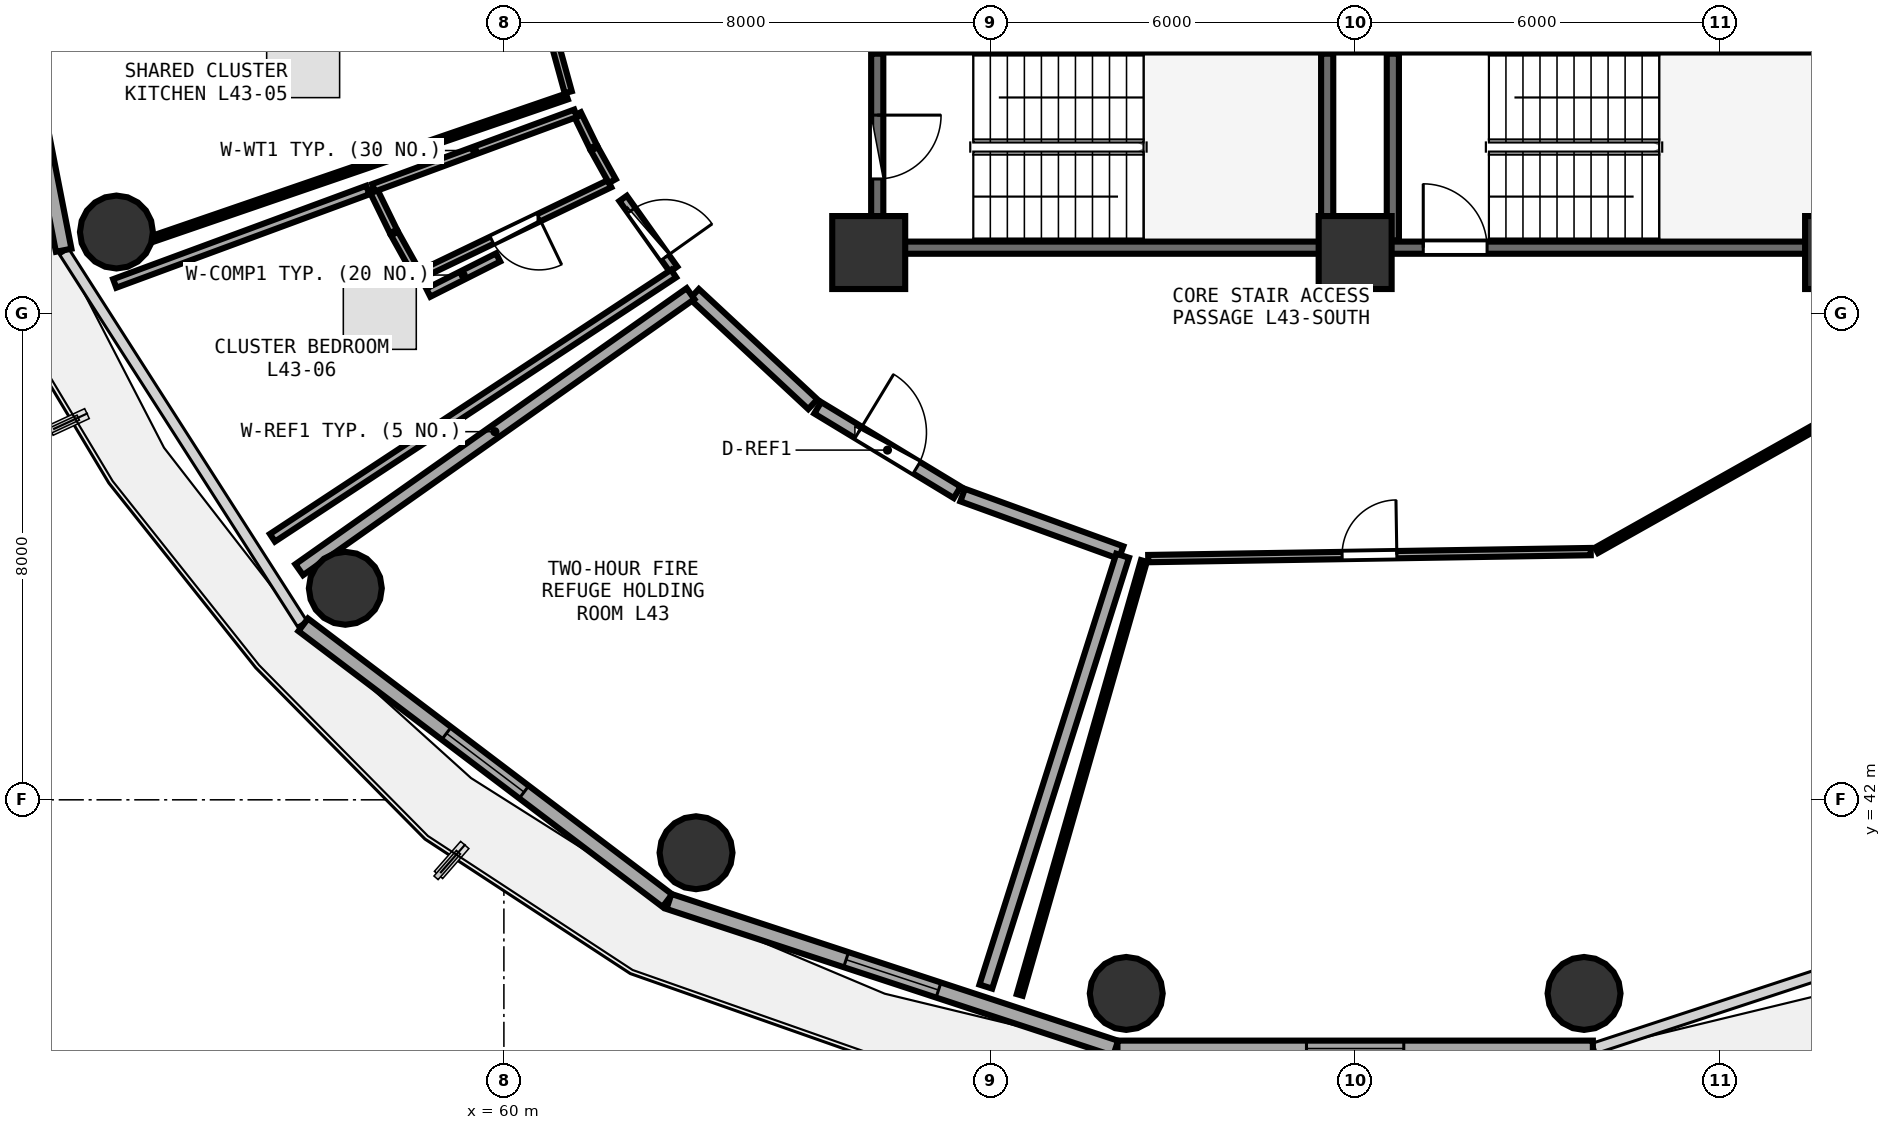
"""IFC4 building model, lengths in metres.
Left out: names, types, materials, properties, quantities, classifications, styles, units other than length and angle.
Written with IfcOpenShell. Run it as: python <this file> out.ifc"""

import sys

from ifc_helpers import new_model, si_unit, direction, frame, frame_2d, origin, origin_2d, place, context, subcontext, project, spatial, rectangle, circle, extrude, element, fill, save


model = new_model("IFC4")
c1 = context("Model", 3, precision=1e-05, world=origin(), true_north=direction((0.0, 1.0)))
c2 = subcontext(c1, "Body", "Model", "MODEL_VIEW")
j1 = project(units=[si_unit("LENGTHUNIT", "METRE"), si_unit("PLANEANGLEUNIT", "RADIAN")], contexts=[c1])
p1 = place(None, origin())
s1 = spatial("IfcSite", under=j1, at=p1, CompositionType="ELEMENT")
p2 = place(p1, origin())
s2 = spatial("IfcBuilding", under=s1, at=p2, CompositionType="ELEMENT")
p3 = place(p2, frame((0.0, 0.0, 169.35)))
s3 = spatial("IfcBuildingStorey", under=s2, at=p3, CompositionType="ELEMENT", Elevation=169.35)
for number, where, z_axis, x_axis in (
    (1, (66.0, 51.0, 0.0), (0.0, 0.0, 1.0), (1.0, 0.0, 0.0)),
    (2, (74.0, 51.0, 0.0), (0.0, 0.0, 1.0), (1.0, 0.0, 0.0)),
    (3, (82.0, 51.0, 0.0), (0.0, 0.0, 1.0), (1.0, 0.0, 0.0)),
):
    element("IfcColumn", number, at=place(p3, frame(where, z_axis=z_axis, x_axis=x_axis)), inside=s3, PredefinedType="PILASTER", context=c2, shape_type="SweptSolid", body=[
        extrude(rectangle(XDim=1.2, YDim=1.2, at=origin_2d()), origin(), (0.0, 0.0, 1.0), 3.75),
    ])
for number, where, z_axis, x_axis in (
    (4, (53.627, 51.337, 0.0), (0.0, 0.0, 1.0), (1.0, 0.0, 0.0)),
    (5, (57.392, 45.479, 0.0), (0.0, 0.0, 1.0), (1.0, 0.0, 0.0)),
    (6, (63.16, 41.13, 0.0), (0.0, 0.0, 1.0), (1.0, 0.0, 0.0)),
    (7, (70.235, 38.816, 0.0), (0.0, 0.0, 1.0), (1.0, 0.0, 0.0)),
    (8, (77.765, 38.816, 0.0), (0.0, 0.0, 1.0), (1.0, 0.0, 0.0)),
):
    element("IfcColumn", number, at=place(p3, frame(where, z_axis=z_axis, x_axis=x_axis)), inside=s3, PredefinedType="COLUMN", context=c2, shape_type="SweptSolid", body=[
        extrude(circle(Radius=0.6, at=origin_2d()), origin(), (0.0, 0.0, 1.0), 3.75),
    ])
p4 = place(p3, frame((51.403, 57.985, 0.0), z_axis=(0.0, 0.0, 1.0), x_axis=(0.191716984769, -0.981450252306, 0.0)))
e9 = element("IfcWall", 9, at=p4, inside=s3, PredefinedType="SOLIDWALL", context=c2, shape_type="SweptSolid", body=[
    extrude(rectangle(XDim=7.079, YDim=0.26, at=frame_2d((3.54, 0.0))), origin(), (0.0, 0.0, 1.0), 3.475),
])
p5 = place(p4, frame((2.74, 0.0, 0.85)))
e10 = element("IfcOpeningElement", 10, at=p5, cuts=e9, PredefinedType="OPENING", context=c2, shape_type="SweptSolid", body=[
    extrude(rectangle(XDim=1.6, YDim=1.45, at=frame_2d((0.8, 0.725))), frame((0.0, 0.14, 0.0), z_axis=(0.0, -1.0, 0.0), x_axis=(1.0, 0.0, 0.0)), (0.0, 0.0, 1.0), 0.28),
])
p6 = place(p3, frame((56.699, 44.878, 0.0), z_axis=(0.0, 0.0, 1.0), x_axis=(0.797163719609, -0.603763202042, 0.0)))
e11 = element("IfcWall", 11, at=p6, inside=s3, PredefinedType="SOLIDWALL", context=c2, shape_type="SweptSolid", body=[
    extrude(rectangle(XDim=7.512, YDim=0.26, at=frame_2d((3.756, 0.0))), origin(), (0.0, 0.0, 1.0), 3.475),
])
p7 = place(p6, frame((2.956, 0.0, 0.85)))
e12 = element("IfcOpeningElement", 12, at=p7, cuts=e11, PredefinedType="OPENING", context=c2, shape_type="SweptSolid", body=[
    extrude(rectangle(XDim=1.6, YDim=1.45, at=frame_2d((0.8, 0.725))), frame((0.0, 0.14, 0.0), z_axis=(0.0, -1.0, 0.0), x_axis=(1.0, 0.0, 0.0)), (0.0, 0.0, 1.0), 0.28),
])
p8 = place(p3, frame((62.714, 40.328, 0.0), z_axis=(0.0, 0.0, 1.0), x_axis=(0.950038302428, -0.312133343173, 0.0)))
e13 = element("IfcWall", 13, at=p8, inside=s3, PredefinedType="SOLIDWALL", context=c2, shape_type="SweptSolid", body=[
    extrude(rectangle(XDim=7.733, YDim=0.26, at=frame_2d((3.867, 0.0))), origin(), (0.0, 0.0, 1.0), 3.475),
])
p9 = place(p8, frame((3.067, 0.0, 0.85)))
e14 = element("IfcOpeningElement", 14, at=p9, cuts=e13, PredefinedType="OPENING", context=c2, shape_type="SweptSolid", body=[
    extrude(rectangle(XDim=1.6, YDim=1.45, at=frame_2d((0.8, 0.725))), frame((0.0, 0.14, 0.0), z_axis=(0.0, -1.0, 0.0), x_axis=(1.0, 0.0, 0.0)), (0.0, 0.0, 1.0), 0.28),
])
p10 = place(p3, frame((70.091, 37.91, 0.0), z_axis=(0.0, 0.0, 1.0), x_axis=(1.0, 0.0, 0.0)))
e15 = element("IfcWall", 15, at=p10, inside=s3, PredefinedType="SOLIDWALL", context=c2, shape_type="SweptSolid", body=[
    extrude(rectangle(XDim=7.819, YDim=0.26, at=frame_2d((3.909, 0.0))), origin(), (0.0, 0.0, 1.0), 3.475),
])
p11 = place(p10, frame((3.109, 0.0, 0.85)))
e16 = element("IfcOpeningElement", 16, at=p11, cuts=e15, PredefinedType="OPENING", context=c2, shape_type="SweptSolid", body=[
    extrude(rectangle(XDim=1.6, YDim=1.45, at=frame_2d((0.8, 0.725))), frame((0.0, 0.14, 0.0), z_axis=(0.0, -1.0, 0.0), x_axis=(1.0, 0.0, 0.0)), (0.0, 0.0, 1.0), 0.28),
])
p12 = place(p3, frame((74.0, 51.08, 0.0), z_axis=(0.0, 0.0, 1.0), x_axis=(1.0, 0.0, 0.0)))
e17 = element("IfcWall", 17, at=p12, inside=s3, PredefinedType="SHEAR", context=c2, shape_type="SweptSolid", body=[
    extrude(rectangle(XDim=7.9, YDim=0.2, at=frame_2d((3.95, 0.0))), origin(), (0.0, 0.0, 1.0), 3.49),
])
p13 = place(p12, frame((1.12, 0.0, 0.0)))
e18 = element("IfcOpeningElement", 18, at=p13, cuts=e17, PredefinedType="OPENING", context=c2, shape_type="SweptSolid", body=[
    extrude(rectangle(XDim=1.05, YDim=2.1, at=frame_2d((0.525, 1.05))), frame((0.0, 0.11, 0.0), z_axis=(0.0, -1.0, 0.0), x_axis=(1.0, 0.0, 0.0)), (0.0, 0.0, 1.0), 0.22),
])
p14 = place(p3, frame((81.9, 54.39, 0.0), z_axis=(0.0, 0.0, 1.0), x_axis=(-1.0, 0.0, 0.0)))
e19 = element("IfcWall", 19, at=p14, inside=s3, PredefinedType="SHEAR", context=c2, shape_type="SweptSolid", body=[
    extrude(rectangle(XDim=8.46, YDim=0.2, at=frame_2d((4.23, 0.0))), origin(), (0.0, 0.0, 1.0), 3.49),
])
p15 = place(p3, frame((74.62, 54.27, 0.0), z_axis=(0.0, 0.0, 1.0), x_axis=(0.0, -1.0, 0.0)))
e20 = element("IfcWall", 20, at=p15, inside=s3, PredefinedType="SHEAR", context=c2, shape_type="SweptSolid", body=[
    extrude(rectangle(XDim=3.07, YDim=0.2, at=frame_2d((1.535, 0.0))), origin(), (0.0, 0.0, 1.0), 3.49),
])
p16 = place(p3, frame((66.26, 51.08, 0.0), z_axis=(0.0, 0.0, 1.0), x_axis=(1.0, 0.0, 0.0)))
e21 = element("IfcWall", 21, at=p16, inside=s3, PredefinedType="SHEAR", context=c2, shape_type="SweptSolid", body=[
    extrude(rectangle(XDim=7.16, YDim=0.2, at=frame_2d((3.58, 0.0))), origin(), (0.0, 0.0, 1.0), 3.49),
])
p17 = place(p3, frame((73.54, 51.2, 0.0), z_axis=(0.0, 0.0, 1.0), x_axis=(0.0, 1.0, 0.0)))
e22 = element("IfcWall", 22, at=p17, inside=s3, PredefinedType="SHEAR", context=c2, shape_type="SweptSolid", body=[
    extrude(rectangle(XDim=3.07, YDim=0.2, at=frame_2d((1.535, 0.0))), origin(), (0.0, 0.0, 1.0), 3.49),
])
p18 = place(p3, frame((73.42, 54.39, 0.0), z_axis=(0.0, 0.0, 1.0), x_axis=(-1.0, 0.0, 0.0)))
e23 = element("IfcWall", 23, at=p18, inside=s3, PredefinedType="SHEAR", context=c2, shape_type="SweptSolid", body=[
    extrude(rectangle(XDim=7.16, YDim=0.2, at=frame_2d((3.58, 0.0))), origin(), (0.0, 0.0, 1.0), 3.49),
])
p19 = place(p3, frame((66.14, 54.27, 0.0), z_axis=(0.0, 0.0, 1.0), x_axis=(0.0, -1.0, 0.0)))
e24 = element("IfcWall", 24, at=p19, inside=s3, PredefinedType="SHEAR", context=c2, shape_type="SweptSolid", body=[
    extrude(rectangle(XDim=3.07, YDim=0.2, at=frame_2d((1.535, 0.0))), origin(), (0.0, 0.0, 1.0), 3.49),
])
p20 = place(p19, frame((1.01, 0.0, 0.0)))
e25 = element("IfcOpeningElement", 25, at=p20, cuts=e24, PredefinedType="OPENING", context=c2, shape_type="SweptSolid", body=[
    extrude(rectangle(XDim=1.05, YDim=2.1, at=frame_2d((0.525, 1.05))), frame((0.0, 0.11, 0.0), z_axis=(0.0, -1.0, 0.0), x_axis=(1.0, 0.0, 0.0)), (0.0, 0.0, 1.0), 0.22),
])
p21 = place(p3, frame((65.161, 48.447, 0.0), z_axis=(0.0, 0.0, 1.0), x_axis=(0.855147717505, -0.518384395257, 0.0)))
e26 = element("IfcWall", 26, at=p21, inside=s3, PredefinedType="SOLIDWALL", context=c2, shape_type="SweptSolid", body=[
    extrude(rectangle(XDim=2.683, YDim=0.22, at=frame_2d((1.342, 0.0))), origin(), (0.0, 0.0, 1.0), 2.975),
])
p22 = place(p21, frame((0.782, 0.0, 0.0)))
e27 = element("IfcOpeningElement", 27, at=p22, cuts=e26, PredefinedType="OPENING", context=c2, shape_type="SweptSolid", body=[
    extrude(rectangle(XDim=1.12, YDim=2.1, at=frame_2d((0.56, 1.05))), frame((0.0, 0.12, 0.0), z_axis=(0.0, -1.0, 0.0), x_axis=(1.0, 0.0, 0.0)), (0.0, 0.0, 1.0), 0.24),
])
p23 = place(p3, frame((70.597, 45.967, 0.0), z_axis=(0.0, 0.0, 1.0), x_axis=(0.999874646692, 0.0158332215, 0.0)))
e28 = element("IfcWall", 28, at=p23, inside=s3, PredefinedType="PARTITIONING", context=c2, shape_type="SweptSolid", body=[
    extrude(rectangle(XDim=7.278, YDim=0.12, at=frame_2d((3.639, 0.0))), origin(), (0.0, 0.0, 1.0), 2.975),
])
p24 = place(p23, frame((3.189, 0.0, 0.0)))
e29 = element("IfcOpeningElement", 29, at=p24, cuts=e28, PredefinedType="OPENING", context=c2, shape_type="SweptSolid", body=[
    extrude(rectangle(XDim=0.9, YDim=2.08, at=frame_2d((0.45, 1.04))), frame((0.0, 0.07, 0.0), z_axis=(0.0, -1.0, 0.0), x_axis=(1.0, 0.0, 0.0)), (0.0, 0.0, 1.0), 0.14),
])
p25 = place(p3, frame((60.288, 56.434, 0.0), z_axis=(0.0, 0.0, 1.0), x_axis=(0.265473290907, -0.964118214647, 0.0)))
e30 = element("IfcWall", 30, at=p25, inside=s3, PredefinedType="PARTITIONING", context=c2, shape_type="SweptSolid", body=[
    extrude(rectangle(XDim=2.901, YDim=0.12, at=frame_2d((1.451, 0.0))), origin(), (0.0, 0.0, 1.0), 3.235),
])
p26 = place(p25, frame((1.001, 0.0, 0.0)))
e31 = element("IfcOpeningElement", 31, at=p26, cuts=e30, PredefinedType="OPENING", context=c2, shape_type="SweptSolid", body=[
    extrude(rectangle(XDim=0.9, YDim=2.08, at=frame_2d((0.45, 1.04))), frame((0.0, 0.07, 0.0), z_axis=(0.0, -1.0, 0.0), x_axis=(1.0, 0.0, 0.0)), (0.0, 0.0, 1.0), 0.14),
])
p27 = place(p3, frame((61.739, 52.132, 0.0), z_axis=(0.0, 0.0, 1.0), x_axis=(-0.901462056275, -0.432858130451, 0.0)))
e32 = element("IfcWall", 32, at=p27, inside=s3, PredefinedType="PLUMBINGWALL", context=c2, shape_type="SweptSolid", body=[
    extrude(rectangle(XDim=3.436, YDim=0.13, at=frame_2d((1.718, 0.0))), origin(), (0.0, 0.0, 1.0), 2.975),
])
p28 = place(p27, frame((1.288, 0.0, 0.0)))
e33 = element("IfcOpeningElement", 33, at=p28, cuts=e32, PredefinedType="OPENING", context=c2, shape_type="SweptSolid", body=[
    extrude(rectangle(XDim=0.86, YDim=2.05, at=frame_2d((0.43, 1.025))), frame((0.0, 0.075, 0.0), z_axis=(0.0, -1.0, 0.0), x_axis=(1.0, 0.0, 0.0)), (0.0, 0.0, 1.0), 0.15),
])
p29 = place(p3, frame((61.961, 51.89, 0.0), z_axis=(0.0, 0.0, 1.0), x_axis=(0.579962011666, -0.814643520213, 0.0)))
e34 = element("IfcWall", 34, at=p29, inside=s3, PredefinedType="PARTITIONING", context=c2, shape_type="SweptSolid", body=[
    extrude(rectangle(XDim=1.43, YDim=0.15, at=frame_2d((0.715, 0.0))), origin(), (0.0, 0.0, 1.0), 2.975),
])
p30 = place(p29, frame((0.24, 0.0, 0.0)))
e35 = element("IfcOpeningElement", 35, at=p30, cuts=e34, PredefinedType="OPENING", context=c2, shape_type="SweptSolid", body=[
    extrude(rectangle(XDim=0.95, YDim=2.08, at=frame_2d((0.475, 1.04))), frame((0.0, 0.085, 0.0), z_axis=(0.0, -1.0, 0.0), x_axis=(1.0, 0.0, 0.0)), (0.0, 0.0, 1.0), 0.17),
])
p31 = place(p3, frame((63.131, 50.32, 0.0), z_axis=(0.0, 0.0, 1.0), x_axis=(0.73204531194, -0.681255944023, 0.0)))
e36 = element("IfcWall", 36, at=p31, inside=s3, PredefinedType="SOLIDWALL", context=c2, shape_type="SweptSolid", body=[
    extrude(rectangle(XDim=2.663, YDim=0.22, at=frame_2d((1.332, 0.0))), origin(), (0.0, 0.0, 1.0), 2.975),
])
p32 = place(p3, frame((67.545, 47.011, 0.0), z_axis=(0.0, 0.0, 1.0), x_axis=(0.939993834649, -0.341191428411, 0.0)))
e37 = element("IfcWall", 37, at=p32, inside=s3, PredefinedType="SOLIDWALL", context=c2, shape_type="SweptSolid", body=[
    extrude(rectangle(XDim=2.772, YDim=0.22, at=frame_2d((1.386, 0.0))), origin(), (0.0, 0.0, 1.0), 3.235),
])
p33 = place(p3, frame((70.176, 46.014, 0.0), z_axis=(0.0, 0.0, 1.0), x_axis=(-0.302609911635, -0.95311449542, 0.0)))
e38 = element("IfcWall", 38, at=p33, inside=s3, PredefinedType="SOLIDWALL", context=c2, shape_type="SweptSolid", body=[
    extrude(rectangle(XDim=7.435, YDim=0.22, at=frame_2d((3.717, 0.0))), origin(), (0.0, 0.0, 1.0), 3.025),
])
p34 = place(p3, frame((56.634, 45.784, 0.0), z_axis=(0.0, 0.0, 1.0), x_axis=(0.817143941798, 0.576433672145, 0.0)))
e39 = element("IfcWall", 39, at=p34, inside=s3, PredefinedType="SOLIDWALL", context=c2, shape_type="SweptSolid", body=[
    extrude(rectangle(XDim=7.876, YDim=0.22, at=frame_2d((3.938, 0.0))), origin(), (0.0, 0.0, 1.0), 3.025),
])
p35 = place(p3, frame((77.969, 46.103, 0.0), z_axis=(0.0, 0.0, 1.0), x_axis=(0.871597530344, 0.490222138523, 0.0)))
e40 = element("IfcWall", 40, at=p35, inside=s3, PredefinedType="PARTITIONING", context=c2, shape_type="SweptSolid", body=[
    extrude(rectangle(XDim=7.115, YDim=0.1, at=frame_2d((3.557, 0.0))), origin(), (0.0, 0.0, 1.0), 2.975),
])
p36 = place(p3, frame((68.483, 38.792, 0.0), z_axis=(0.0, 0.0, 1.0), x_axis=(0.275233695356, 0.961377352001, 0.0)))
e41 = element("IfcWall", 41, at=p36, inside=s3, PredefinedType="PARTITIONING", context=c2, shape_type="SweptSolid", body=[
    extrude(rectangle(XDim=7.423, YDim=0.1, at=frame_2d((3.711, 0.0))), origin(), (0.0, 0.0, 1.0), 3.025),
])
p37 = place(p3, frame((61.036, 53.566, 0.0), z_axis=(0.0, 0.0, 1.0), x_axis=(-0.945736878945, -0.324933463656, 0.0)))
e42 = element("IfcWall", 42, at=p37, inside=s3, PredefinedType="PARTITIONING", context=c2, shape_type="SweptSolid", body=[
    extrude(rectangle(XDim=7.182, YDim=0.1, at=frame_2d((3.591, 0.0))), origin(), (0.0, 0.0, 1.0), 2.975),
])
p38 = place(p3, frame((61.207, 53.279, 0.0), z_axis=(0.0, 0.0, 1.0), x_axis=(0.438415626727, -0.898772350621, 0.0)))
e43 = element("IfcWall", 43, at=p38, inside=s3, PredefinedType="PLUMBINGWALL", context=c2, shape_type="SweptSolid", body=[
    extrude(rectangle(XDim=0.601, YDim=0.13, at=frame_2d((0.3, 0.0))), origin(), (0.0, 0.0, 1.0), 3.235),
])
p39 = place(p3, frame((61.489, 52.704, 0.0), z_axis=(0.0, 0.0, 1.0), x_axis=(0.486979465227, -0.873413418976, 0.0)))
e44 = element("IfcWall", 44, at=p39, inside=s3, PredefinedType="PLUMBINGWALL", context=c2, shape_type="SweptSolid", body=[
    extrude(rectangle(XDim=0.604, YDim=0.13, at=frame_2d((0.302, 0.0))), origin(), (0.0, 0.0, 1.0), 3.48),
])
p40 = place(p3, frame((58.578, 50.636, 0.0), z_axis=(0.0, 0.0, 1.0), x_axis=(-0.486767500689, 0.873531567989, 0.0)))
e45 = element("IfcWall", 45, at=p40, inside=s3, PredefinedType="PLUMBINGWALL", context=c2, shape_type="SweptSolid", body=[
    extrude(rectangle(XDim=0.774, YDim=0.13, at=frame_2d((0.387, 0.0))), origin(), (0.0, 0.0, 1.0), 2.975),
])
p41 = place(p3, frame((58.183, 51.348, 0.0), z_axis=(0.0, 0.0, 1.0), x_axis=(-0.438186235671, 0.898884209934, 0.0)))
e46 = element("IfcWall", 46, at=p41, inside=s3, PredefinedType="PLUMBINGWALL", context=c2, shape_type="SweptSolid", body=[
    extrude(rectangle(XDim=0.77, YDim=0.13, at=frame_2d((0.385, 0.0))), origin(), (0.0, 0.0, 1.0), 2.975),
])
p42 = place(p3, frame((57.856, 52.065, 0.0), z_axis=(0.0, 0.0, 1.0), x_axis=(0.938283087043, 0.345868253198, 0.0)))
e47 = element("IfcWall", 47, at=p42, inside=s3, PredefinedType="PLUMBINGWALL", context=c2, shape_type="SweptSolid", body=[
    extrude(rectangle(XDim=3.542, YDim=0.13, at=frame_2d((1.771, 0.0))), origin(), (0.0, 0.0, 1.0), 3.175),
])
p43 = place(p3, frame((62.792, 50.654, 0.0), z_axis=(0.0, 0.0, 1.0), x_axis=(-0.83517952007, -0.549977426133, 0.0)))
e48 = element("IfcWall", 48, at=p43, inside=s3, PredefinedType="PARTITIONING", context=c2, shape_type="SweptSolid", body=[
    extrude(rectangle(XDim=7.9, YDim=0.15, at=frame_2d((3.95, 0.0))), origin(), (0.0, 0.0, 1.0), 3.025),
])
p44 = place(p3, frame((53.6, 50.492, 0.0), z_axis=(0.0, 0.0, 1.0), x_axis=(0.938127824556, 0.346289163554, 0.0)))
e49 = element("IfcWall", 49, at=p44, inside=s3, PredefinedType="PARTITIONING", context=c2, shape_type="SweptSolid", body=[
    extrude(rectangle(XDim=4.438, YDim=0.15, at=frame_2d((2.219, 0.0))), origin(), (0.0, 0.0, 1.0), 2.975),
])
p45 = place(p3, frame((58.757, 50.34, 0.0), z_axis=(0.0, 0.0, 1.0), x_axis=(0.89282717288, 0.450399422033, 0.0)))
e50 = element("IfcWall", 50, at=p45, inside=s3, PredefinedType="PARTITIONING", context=c2, shape_type="SweptSolid", body=[
    extrude(rectangle(XDim=1.286, YDim=0.15, at=frame_2d((0.643, 0.0))), origin(), (0.0, 0.0, 1.0), 3.175),
])
p46 = place(p7, origin())
e51 = element("IfcWindow", 51, at=p46, inside=s3, PartitioningType="SINGLE_PANEL", PredefinedType="WINDOW", context=c2, shape_type="SweptSolid", body=[
    extrude(rectangle(XDim=1.6, YDim=1.45, at=frame_2d((0.8, 0.725))), frame((0.0, 0.03, 0.0), z_axis=(0.0, -1.0, 0.0), x_axis=(1.0, 0.0, 0.0)), (0.0, 0.0, 1.0), 0.06),
])
fill(e12, e51)
p47 = place(p9, origin())
e52 = element("IfcWindow", 52, at=p47, inside=s3, PartitioningType="SINGLE_PANEL", PredefinedType="WINDOW", context=c2, shape_type="SweptSolid", body=[
    extrude(rectangle(XDim=1.6, YDim=1.45, at=frame_2d((0.8, 0.725))), frame((0.0, 0.03, 0.0), z_axis=(0.0, -1.0, 0.0), x_axis=(1.0, 0.0, 0.0)), (0.0, 0.0, 1.0), 0.06),
])
fill(e14, e52)
p48 = place(p11, origin())
e53 = element("IfcWindow", 53, at=p48, inside=s3, PartitioningType="SINGLE_PANEL", PredefinedType="WINDOW", context=c2, shape_type="SweptSolid", body=[
    extrude(rectangle(XDim=1.6, YDim=1.45, at=frame_2d((0.8, 0.725))), frame((0.0, 0.03, 0.0), z_axis=(0.0, -1.0, 0.0), x_axis=(1.0, 0.0, 0.0)), (0.0, 0.0, 1.0), 0.06),
])
fill(e16, e53)
p49 = place(p13, origin())
e54 = element("IfcDoor", 54, at=p49, inside=s3, OperationType="SINGLE_SWING_LEFT", PredefinedType="DOOR", context=c2, shape_type="SweptSolid", body=[
    extrude(rectangle(XDim=1.05, YDim=2.1, at=frame_2d((0.525, 1.05))), frame((0.0, 0.025, 0.0), z_axis=(0.0, -1.0, 0.0), x_axis=(1.0, 0.0, 0.0)), (0.0, 0.0, 1.0), 0.05),
])
fill(e18, e54)
p50 = place(p20, origin())
e55 = element("IfcDoor", 55, at=p50, inside=s3, OperationType="SINGLE_SWING_LEFT", PredefinedType="DOOR", context=c2, shape_type="SweptSolid", body=[
    extrude(rectangle(XDim=1.05, YDim=2.1, at=frame_2d((0.525, 1.05))), frame((0.0, 0.025, 0.0), z_axis=(0.0, -1.0, 0.0), x_axis=(1.0, 0.0, 0.0)), (0.0, 0.0, 1.0), 0.05),
])
fill(e25, e55)
p51 = place(p22, origin())
e56 = element("IfcDoor", 56, at=p51, inside=s3, OperationType="SINGLE_SWING_LEFT", PredefinedType="DOOR", context=c2, shape_type="SweptSolid", body=[
    extrude(rectangle(XDim=1.12, YDim=2.1, at=frame_2d((0.56, 1.05))), frame((0.0, 0.025, 0.0), z_axis=(0.0, -1.0, 0.0), x_axis=(1.0, 0.0, 0.0)), (0.0, 0.0, 1.0), 0.05),
])
fill(e27, e56)
p52 = place(p24, origin())
e57 = element("IfcDoor", 57, at=p52, inside=s3, OperationType="SINGLE_SWING_RIGHT", PredefinedType="DOOR", context=c2, shape_type="SweptSolid", body=[
    extrude(rectangle(XDim=0.9, YDim=2.08, at=frame_2d((0.45, 1.04))), frame((0.0, 0.025, 0.0), z_axis=(0.0, -1.0, 0.0), x_axis=(1.0, 0.0, 0.0)), (0.0, 0.0, 1.0), 0.05),
])
fill(e29, e57)
p53 = place(p28, origin())
e58 = element("IfcDoor", 58, at=p53, inside=s3, OperationType="SINGLE_SWING_LEFT", PredefinedType="DOOR", context=c2, shape_type="SweptSolid", body=[
    extrude(rectangle(XDim=0.86, YDim=2.05, at=frame_2d((0.43, 1.025))), frame((0.0, 0.025, 0.0), z_axis=(0.0, -1.0, 0.0), x_axis=(1.0, 0.0, 0.0)), (0.0, 0.0, 1.0), 0.05),
])
fill(e33, e58)
p54 = place(p30, origin())
e59 = element("IfcDoor", 59, at=p54, inside=s3, OperationType="SINGLE_SWING_RIGHT", PredefinedType="DOOR", context=c2, shape_type="SweptSolid", body=[
    extrude(rectangle(XDim=0.95, YDim=2.08, at=frame_2d((0.475, 1.04))), frame((0.0, 0.025, 0.0), z_axis=(0.0, -1.0, 0.0), x_axis=(1.0, 0.0, 0.0)), (0.0, 0.0, 1.0), 0.05),
])
fill(e35, e59)
save(model, sys.argv[1])
